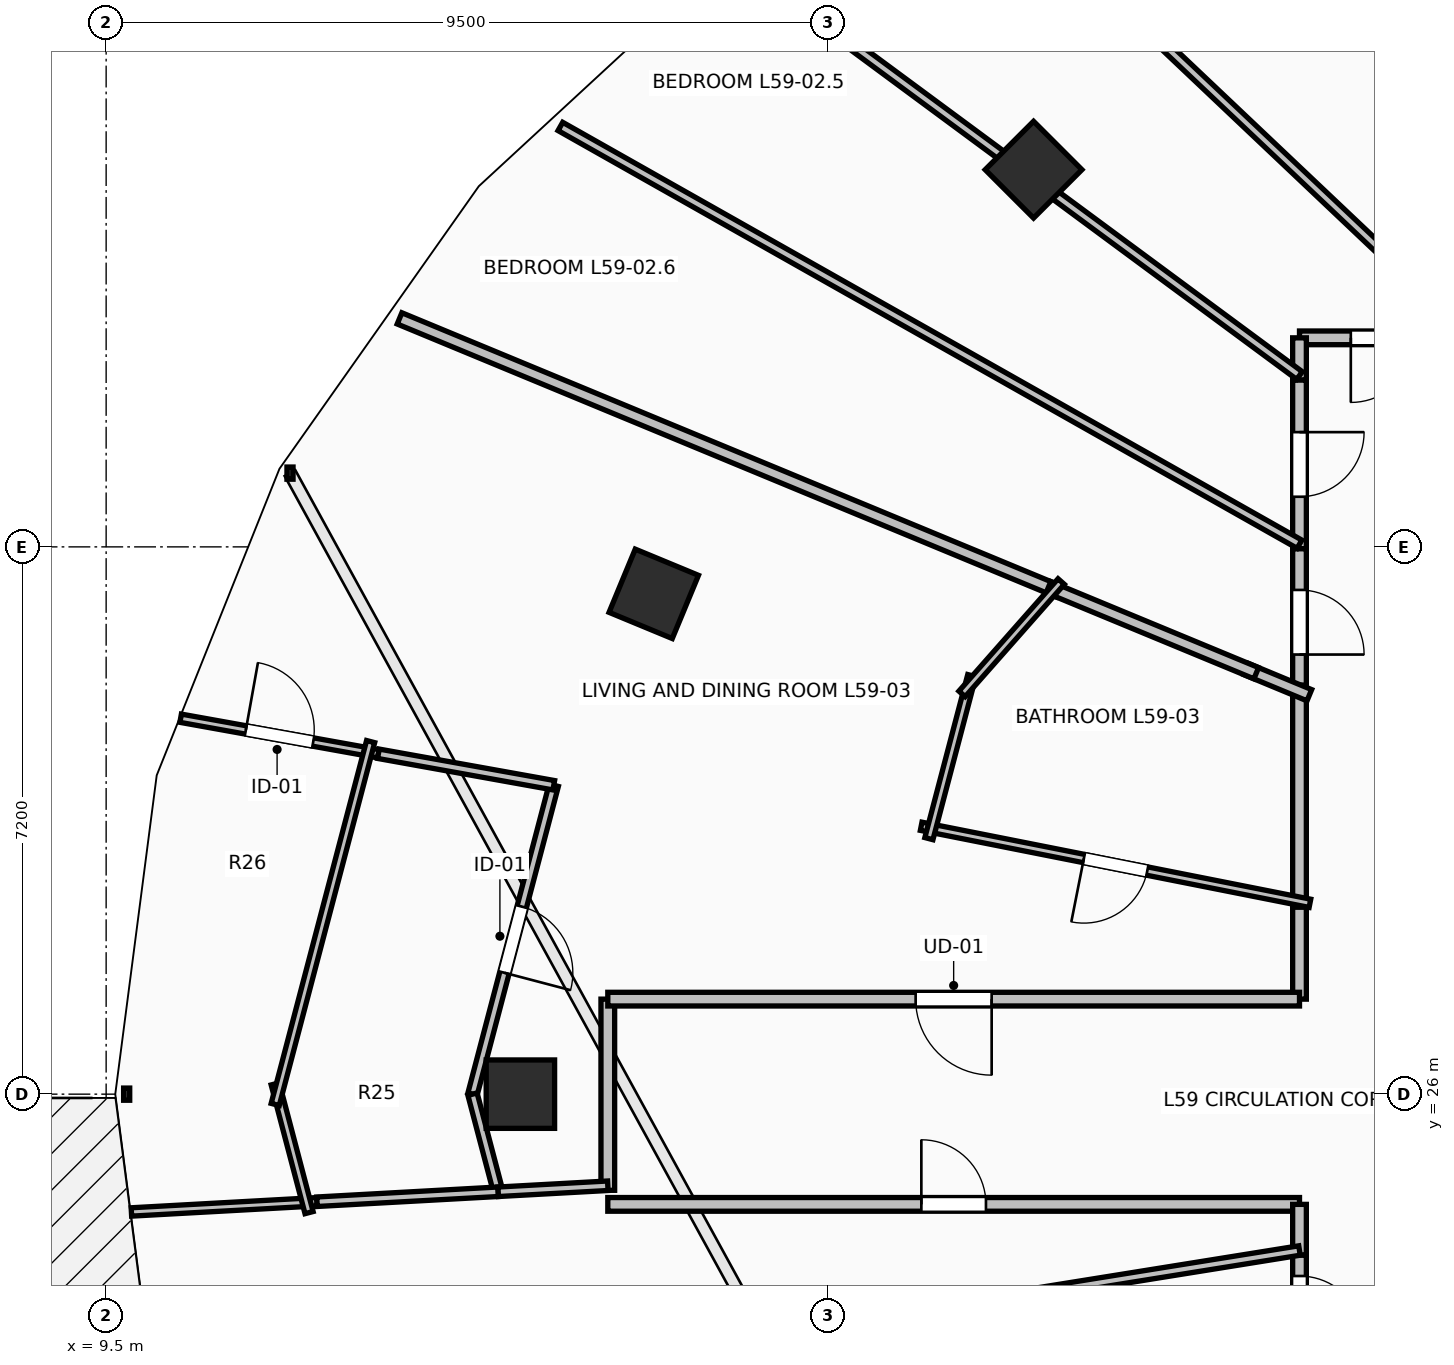
"""IFC4 building model, lengths in metres.
Left out: names, types, materials, properties, quantities, classifications, styles, units other than length and angle.
Written with IfcOpenShell. Run it as: python <this file> out.ifc"""

import sys

from ifc_helpers import new_model, si_unit, direction, frame, frame_2d, origin, origin_2d, place, context, subcontext, project, spatial, rectangle, extrude, element, fill, save


model = new_model("IFC4")
c1 = context("Model", 3, precision=1e-05, world=origin(), true_north=direction((0.0, 1.0)))
c2 = subcontext(c1, "Body", "Model", "MODEL_VIEW")
j1 = project(units=[si_unit("LENGTHUNIT", "METRE"), si_unit("PLANEANGLEUNIT", "RADIAN")], contexts=[c1])
p1 = place(None, origin())
s1 = spatial("IfcSite", under=j1, at=p1, CompositionType="ELEMENT")
p2 = place(p1, origin())
s2 = spatial("IfcBuilding", under=s1, at=p2, CompositionType="ELEMENT")
p3 = place(p2, frame((0.0, 0.0, 217.85)))
s3 = spatial("IfcBuildingStorey", under=s2, at=p3, CompositionType="ELEMENT", Elevation=217.85)
for number, where, z_axis, x_axis in (
    (1, (21.701, 38.162, 0.0), (0.0, 0.0, 1.0), (-0.707, 0.707, 0.0)),
    (2, (16.705, 32.582, 0.0), (0.0, 0.0, 1.0), (-0.924, 0.383, 0.0)),
    (3, (14.95, 26.0, 0.0), (0.0, 0.0, 1.0), (-1.0, 0.0, 0.0)),
):
    element("IfcColumn", number, at=place(p3, frame(where, z_axis=z_axis, x_axis=x_axis)), inside=s3, PredefinedType="COLUMN", context=c2, shape_type="SweptSolid", body=[
        extrude(rectangle(XDim=0.9, YDim=0.9, at=origin_2d()), origin(), (0.0, 0.0, 1.0), 3.55),
    ])
p4 = place(p3, frame((27.4, 35.95, 0.0), z_axis=(0.0, 0.0, 1.0), x_axis=(-1.0, 0.0, 0.0)))
e4 = element("IfcWall", 4, at=p4, inside=s3, PredefinedType="PARTITIONING", context=c2, shape_type="SweptSolid", body=[
    extrude(rectangle(XDim=2.2, YDim=0.18, at=frame_2d((1.1, 0.0))), origin(), (0.0, 0.0, 1.0), 2.924),
])
p5 = place(p4, frame((0.675, 0.0, 0.0)))
e5 = element("IfcOpeningElement", 5, at=p5, cuts=e4, PredefinedType="OPENING", context=c2, shape_type="SweptSolid", body=[
    extrude(rectangle(XDim=0.85, YDim=2.1, at=frame_2d((0.425, 1.05))), frame((0.0, 0.105, 0.0), z_axis=(0.0, -1.0, 0.0), x_axis=(1.0, 0.0, 0.0)), (0.0, 0.0, 1.0), 0.21),
])
p6 = place(p3, frame((25.2, 35.95, 0.0), z_axis=(0.0, 0.0, 1.0), x_axis=(0.0, -1.0, 0.0)))
e6 = element("IfcWall", 6, at=p6, inside=s3, PredefinedType="PARTITIONING", context=c2, shape_type="SweptSolid", body=[
    extrude(rectangle(XDim=0.556, YDim=0.18, at=frame_2d((0.278, 0.0))), origin(), (0.0, 0.0, 1.0), 3.29),
])
p7 = place(p3, frame((25.2, 35.394, 0.0), z_axis=(0.0, 0.0, 1.0), x_axis=(0.0, -1.0, 0.0)))
e7 = element("IfcWall", 7, at=p7, inside=s3, PredefinedType="PARTITIONING", context=c2, shape_type="SweptSolid", body=[
    extrude(rectangle(XDim=2.219, YDim=0.18, at=frame_2d((1.109, 0.0))), origin(), (0.0, 0.0, 1.0), 2.482),
])
p8 = place(p7, frame((0.685, 0.0, 0.0)))
e8 = element("IfcOpeningElement", 8, at=p8, cuts=e7, PredefinedType="OPENING", context=c2, shape_type="SweptSolid", body=[
    extrude(rectangle(XDim=0.85, YDim=2.1, at=frame_2d((0.425, 1.05))), frame((0.0, 0.105, 0.0), z_axis=(0.0, -1.0, 0.0), x_axis=(1.0, 0.0, 0.0)), (0.0, 0.0, 1.0), 0.21),
])
p9 = place(p3, frame((25.2, 33.175, 0.0), z_axis=(0.0, 0.0, 1.0), x_axis=(0.0, -1.0, 0.0)))
e9 = element("IfcWall", 9, at=p9, inside=s3, PredefinedType="PARTITIONING", context=c2, shape_type="SweptSolid", body=[
    extrude(rectangle(XDim=1.933, YDim=0.18, at=frame_2d((0.967, 0.0))), origin(), (0.0, 0.0, 1.0), 3.29),
])
p10 = place(p9, frame((0.542, 0.0, 0.0)))
e10 = element("IfcOpeningElement", 10, at=p10, cuts=e9, PredefinedType="OPENING", context=c2, shape_type="SweptSolid", body=[
    extrude(rectangle(XDim=0.85, YDim=2.1, at=frame_2d((0.425, 1.05))), frame((0.0, 0.105, 0.0), z_axis=(0.0, -1.0, 0.0), x_axis=(1.0, 0.0, 0.0)), (0.0, 0.0, 1.0), 0.21),
])
p11 = place(p3, frame((16.1, 27.25, 0.0), z_axis=(0.0, 0.0, 1.0), x_axis=(0.0, -1.0, 0.0)))
e11 = element("IfcWall", 11, at=p11, inside=s3, PredefinedType="PARTITIONING", context=c2, shape_type="SweptSolid", body=[
    extrude(rectangle(XDim=2.515, YDim=0.18, at=frame_2d((1.257, 0.0))), origin(), (0.0, 0.0, 1.0), 2.482),
])
p12 = place(p3, frame((25.2, 28.599, 0.0), z_axis=(0.0, 0.0, 1.0), x_axis=(0.0, -1.0, 0.0)))
e12 = element("IfcWall", 12, at=p12, inside=s3, PredefinedType="PARTITIONING", context=c2, shape_type="SweptSolid", body=[
    extrude(rectangle(XDim=1.349, YDim=0.18, at=frame_2d((0.675, 0.0))), origin(), (0.0, 0.0, 1.0), 2.482),
])
p13 = place(p3, frame((25.2, 27.25, 0.0), z_axis=(0.0, 0.0, 1.0), x_axis=(-1.0, 0.0, 0.0)))
e13 = element("IfcWall", 13, at=p13, inside=s3, PredefinedType="PARTITIONING", context=c2, shape_type="SweptSolid", body=[
    extrude(rectangle(XDim=9.1, YDim=0.18, at=frame_2d((4.55, 0.0))), origin(), (0.0, 0.0, 1.0), 2.482),
])
p14 = place(p13, frame((4.05, 0.0, 0.0)))
e14 = element("IfcOpeningElement", 14, at=p14, cuts=e13, PredefinedType="OPENING", context=c2, shape_type="SweptSolid", body=[
    extrude(rectangle(XDim=1.0, YDim=2.15, at=frame_2d((0.5, 1.075))), frame((0.0, 0.105, 0.0), z_axis=(0.0, -1.0, 0.0), x_axis=(1.0, 0.0, 0.0)), (0.0, 0.0, 1.0), 0.21),
])
p15 = place(p3, frame((25.2, 31.382, 0.0), z_axis=(0.0, 0.0, 1.0), x_axis=(0.0, -1.0, 0.0)))
e15 = element("IfcWall", 15, at=p15, inside=s3, PredefinedType="PARTITIONING", context=c2, shape_type="SweptSolid", body=[
    extrude(rectangle(XDim=2.923, YDim=0.18, at=frame_2d((1.461, 0.0))), origin(), (0.0, 0.0, 1.0), 2.482),
])
p16 = place(p3, frame((16.1, 24.55, 0.0), z_axis=(0.0, 0.0, 1.0), x_axis=(1.0, 0.0, 0.0)))
e16 = element("IfcWall", 16, at=p16, inside=s3, PredefinedType="PARTITIONING", context=c2, shape_type="SweptSolid", body=[
    extrude(rectangle(XDim=9.1, YDim=0.18, at=frame_2d((4.55, 0.0))), origin(), (0.0, 0.0, 1.0), 2.924),
])
p17 = place(p16, frame((4.125, 0.0, 0.0)))
e17 = element("IfcOpeningElement", 17, at=p17, cuts=e16, PredefinedType="OPENING", context=c2, shape_type="SweptSolid", body=[
    extrude(rectangle(XDim=0.85, YDim=2.1, at=frame_2d((0.425, 1.05))), frame((0.0, 0.105, 0.0), z_axis=(0.0, -1.0, 0.0), x_axis=(1.0, 0.0, 0.0)), (0.0, 0.0, 1.0), 0.21),
])
p18 = place(p3, frame((25.2, 24.55, 0.0), z_axis=(0.0, 0.0, 1.0), x_axis=(0.0, -1.0, 0.0)))
e18 = element("IfcWall", 18, at=p18, inside=s3, PredefinedType="PARTITIONING", context=c2, shape_type="SweptSolid", body=[
    extrude(rectangle(XDim=0.668, YDim=0.18, at=frame_2d((0.334, 0.0))), origin(), (0.0, 0.0, 1.0), 3.29),
])
p19 = place(p3, frame((25.2, 23.882, 0.0), z_axis=(0.0, 0.0, 1.0), x_axis=(0.0, -1.0, 0.0)))
e19 = element("IfcWall", 19, at=p19, inside=s3, PredefinedType="PARTITIONING", context=c2, shape_type="SweptSolid", body=[
    extrude(rectangle(XDim=1.399, YDim=0.18, at=frame_2d((0.7, 0.0))), origin(), (0.0, 0.0, 1.0), 3.29),
])
p20 = place(p19, frame((0.274, 0.0, 0.0)))
e20 = element("IfcOpeningElement", 20, at=p20, cuts=e19, PredefinedType="OPENING", context=c2, shape_type="SweptSolid", body=[
    extrude(rectangle(XDim=0.85, YDim=2.1, at=frame_2d((0.425, 1.05))), frame((0.0, 0.105, 0.0), z_axis=(0.0, -1.0, 0.0), x_axis=(1.0, 0.0, 0.0)), (0.0, 0.0, 1.0), 0.21),
])
p21 = place(p3, frame((25.749, 45.138, 0.0), z_axis=(0.0, 0.0, 1.0), x_axis=(0.539168632786, -0.842197830335, 0.0)))
e21 = element("IfcWall", 21, at=p21, inside=s3, PredefinedType="PARTITIONING", context=c2, shape_type="SweptSolid", body=[
    extrude(rectangle(XDim=10.909, YDim=0.125, at=frame_2d((5.455, 0.0))), origin(), (0.0, 0.0, 1.0), 2.482),
])
p22 = place(p3, frame((23.066, 44.052, 0.0), z_axis=(0.0, 0.0, 1.0), x_axis=(0.637453668746, -0.770488689211, 0.0)))
e22 = element("IfcWall", 22, at=p22, inside=s3, PredefinedType="PARTITIONING", context=c2, shape_type="SweptSolid", body=[
    extrude(rectangle(XDim=10.515, YDim=0.125, at=frame_2d((5.258, 0.0))), origin(), (0.0, 0.0, 1.0), 2.482),
])
p23 = place(p3, frame((20.462, 42.599, 0.0), z_axis=(0.0, 0.0, 1.0), x_axis=(0.726274273347, -0.687405033349, 0.0)))
e23 = element("IfcWall", 23, at=p23, inside=s3, PredefinedType="PARTITIONING", context=c2, shape_type="SweptSolid", body=[
    extrude(rectangle(XDim=9.673, YDim=0.125, at=frame_2d((4.836, 0.0))), origin(), (0.0, 0.0, 1.0), 2.824),
])
p24 = place(p3, frame((17.826, 40.901, 0.0), z_axis=(0.0, 0.0, 1.0), x_axis=(0.804363169868, -0.594137939338, 0.0)))
e24 = element("IfcWall", 24, at=p24, inside=s3, PredefinedType="PARTITIONING", context=c2, shape_type="SweptSolid", body=[
    extrude(rectangle(XDim=9.167, YDim=0.125, at=frame_2d((4.584, 0.0))), origin(), (0.0, 0.0, 1.0), 2.482),
])
p25 = place(p3, frame((15.476, 38.731, 0.0), z_axis=(0.0, 0.0, 1.0), x_axis=(0.870572608778, -0.49203997078, 0.0)))
e25 = element("IfcWall", 25, at=p25, inside=s3, PredefinedType="PARTITIONING", context=c2, shape_type="SweptSolid", body=[
    extrude(rectangle(XDim=11.169, YDim=0.125, at=frame_2d((5.585, 0.0))), origin(), (0.0, 0.0, 1.0), 2.824),
])
p26 = place(p3, frame((13.36, 36.206, 0.0), z_axis=(0.0, 0.0, 1.0), x_axis=(0.923875681471, -0.382692729466, 0.0)))
e26 = element("IfcWall", 26, at=p26, inside=s3, PredefinedType="PARTITIONING", context=c2, shape_type="SweptSolid", body=[
    extrude(rectangle(XDim=9.381, YDim=0.16, at=frame_2d((4.69, 0.0))), origin(), (0.0, 0.0, 1.0), 2.824),
])
p27 = place(p3, frame((24.502, 31.592, 0.0), z_axis=(0.0, 0.0, 1.0), x_axis=(0.923704487622, -0.383105755043, 0.0)))
e27 = element("IfcWall", 27, at=p27, inside=s3, PredefinedType="PARTITIONING", context=c2, shape_type="SweptSolid", body=[
    extrude(rectangle(XDim=0.896, YDim=0.16, at=frame_2d((0.448, 0.0))), origin(), (0.0, 0.0, 1.0), 3.29),
])
p28 = place(p3, frame((21.898, 32.67, 0.0), z_axis=(0.0, 0.0, 1.0), x_axis=(0.923953480513, -0.382504857286, 0.0)))
e28 = element("IfcWall", 28, at=p28, inside=s3, PredefinedType="PARTITIONING", context=c2, shape_type="SweptSolid", body=[
    extrude(rectangle(XDim=2.958, YDim=0.16, at=frame_2d((1.479, 0.0))), origin(), (0.0, 0.0, 1.0), 2.924),
])
p29 = place(p3, frame((25.337, 28.511, 0.0), z_axis=(0.0, 0.0, 1.0), x_axis=(-0.980930272027, 0.194359978959, 0.0)))
e29 = element("IfcWall", 29, at=p29, inside=s3, PredefinedType="PARTITIONING", context=c2, shape_type="SweptSolid", body=[
    extrude(rectangle(XDim=5.214, YDim=0.11, at=frame_2d((2.607, 0.0))), origin(), (0.0, 0.0, 1.0), 2.924),
])
p30 = place(p29, frame((2.182, 0.0, 0.0)))
e30 = element("IfcOpeningElement", 30, at=p30, cuts=e29, PredefinedType="OPENING", context=c2, shape_type="SweptSolid", body=[
    extrude(rectangle(XDim=0.85, YDim=2.1, at=frame_2d((0.425, 1.05))), frame((0.0, 0.07, 0.0), z_axis=(0.0, -1.0, 0.0), x_axis=(1.0, 0.0, 0.0)), (0.0, 0.0, 1.0), 0.14),
])
p31 = place(p3, frame((20.324, 29.362, 0.0), z_axis=(0.0, 0.0, 1.0), x_axis=(0.254406599134, 0.967097348935, 0.0)))
e31 = element("IfcWall", 31, at=p31, inside=s3, PredefinedType="PARTITIONING", context=c2, shape_type="SweptSolid", body=[
    extrude(rectangle(XDim=2.218, YDim=0.11, at=frame_2d((1.109, 0.0))), origin(), (0.0, 0.0, 1.0), 2.482),
])
p32 = place(p3, frame((20.76, 31.266, 0.0), z_axis=(0.0, 0.0, 1.0), x_axis=(0.661699472354, 0.749769170003, 0.0)))
e32 = element("IfcWall", 32, at=p32, inside=s3, PredefinedType="PARTITIONING", context=c2, shape_type="SweptSolid", body=[
    extrude(rectangle(XDim=1.971, YDim=0.11, at=frame_2d((0.985, 0.0))), origin(), (0.0, 0.0, 1.0), 3.29),
])
p33 = place(p3, frame((12.274, 24.585, 0.0), z_axis=(0.0, 0.0, 1.0), x_axis=(-0.998485442787, -0.055016547898, 0.0)))
e33 = element("IfcWall", 33, at=p33, inside=s3, PredefinedType="PARTITIONING", context=c2, shape_type="SweptSolid", body=[
    extrude(rectangle(XDim=2.445, YDim=0.11, at=frame_2d((1.223, 0.0))), origin(), (0.0, 0.0, 1.0), 3.29),
])
p34 = place(p3, frame((10.48, 30.946, 0.0), z_axis=(0.0, 0.0, 1.0), x_axis=(0.98423288508, -0.176877437587, 0.0)))
e34 = element("IfcWall", 34, at=p34, inside=s3, PredefinedType="PARTITIONING", context=c2, shape_type="SweptSolid", body=[
    extrude(rectangle(XDim=2.643, YDim=0.11, at=frame_2d((1.322, 0.0))), origin(), (0.0, 0.0, 1.0), 3.29),
])
p35 = place(p34, frame((0.872, 0.0, 0.0)))
e35 = element("IfcOpeningElement", 35, at=p35, cuts=e34, PredefinedType="OPENING", context=c2, shape_type="SweptSolid", body=[
    extrude(rectangle(XDim=0.9, YDim=2.1, at=frame_2d((0.45, 1.05))), frame((0.0, 0.07, 0.0), z_axis=(0.0, -1.0, 0.0), x_axis=(1.0, 0.0, 0.0)), (0.0, 0.0, 1.0), 0.14),
])
p36 = place(p3, frame((15.389, 30.064, 0.0), z_axis=(0.0, 0.0, 1.0), x_axis=(-0.254356027292, -0.967110651053, 0.0)))
e36 = element("IfcWall", 36, at=p36, inside=s3, PredefinedType="PARTITIONING", context=c2, shape_type="SweptSolid", body=[
    extrude(rectangle(XDim=4.202, YDim=0.125, at=frame_2d((2.101, 0.0))), origin(), (0.0, 0.0, 1.0), 3.29),
])
p37 = place(p36, frame((1.651, 0.0, 0.0)))
e37 = element("IfcOpeningElement", 37, at=p37, cuts=e36, PredefinedType="OPENING", context=c2, shape_type="SweptSolid", body=[
    extrude(rectangle(XDim=0.9, YDim=2.1, at=frame_2d((0.45, 1.05))), frame((0.0, 0.077, 0.0), z_axis=(0.0, -1.0, 0.0), x_axis=(1.0, 0.0, 0.0)), (0.0, 0.0, 1.0), 0.155),
])
p38 = place(p3, frame((14.32, 26.0, 0.0), z_axis=(0.0, 0.0, 1.0), x_axis=(0.254502350799, -0.967072155239, 0.0)))
e38 = element("IfcWall", 38, at=p38, inside=s3, PredefinedType="PARTITIONING", context=c2, shape_type="SweptSolid", body=[
    extrude(rectangle(XDim=1.328, YDim=0.125, at=frame_2d((0.664, 0.0))), origin(), (0.0, 0.0, 1.0), 3.29),
])
p39 = place(p3, frame((14.658, 24.716, 0.0), z_axis=(0.0, 0.0, 1.0), x_axis=(-0.998486041439, -0.055005681988, 0.0)))
e39 = element("IfcWall", 39, at=p39, inside=s3, PredefinedType="PARTITIONING", context=c2, shape_type="SweptSolid", body=[
    extrude(rectangle(XDim=2.388, YDim=0.125, at=frame_2d((1.194, 0.0))), origin(), (0.0, 0.0, 1.0), 3.29),
])
p40 = place(p3, frame((13.082, 30.478, 0.0), z_axis=(0.0, 0.0, 1.0), x_axis=(0.984255878712, -0.176749441923, 0.0)))
e40 = element("IfcWall", 40, at=p40, inside=s3, PredefinedType="PARTITIONING", context=c2, shape_type="SweptSolid", body=[
    extrude(rectangle(XDim=2.344, YDim=0.125, at=frame_2d((1.172, 0.0))), origin(), (0.0, 0.0, 1.0), 3.29),
])
p41 = place(p3, frame((14.658, 24.716, 0.0), z_axis=(0.0, 0.0, 1.0), x_axis=(0.99849911476, 0.054767853933, 0.0)))
e41 = element("IfcWall", 41, at=p41, inside=s3, PredefinedType="PARTITIONING", context=c2, shape_type="SweptSolid", body=[
    extrude(rectangle(XDim=1.444, YDim=0.125, at=frame_2d((0.722, 0.0))), origin(), (0.0, 0.0, 1.0), 2.824),
])
p42 = place(p3, frame((12.17, 24.442, 0.0), z_axis=(0.0, 0.0, 1.0), x_axis=(-0.254260000639, 0.967135901554, 0.0)))
e42 = element("IfcWall", 42, at=p42, inside=s3, PredefinedType="PARTITIONING", context=c2, shape_type="SweptSolid", body=[
    extrude(rectangle(XDim=1.751, YDim=0.11, at=frame_2d((0.876, 0.0))), origin(), (0.0, 0.0, 1.0), 3.29),
])
p43 = place(p3, frame((11.724, 25.865, 0.0), z_axis=(0.0, 0.0, 1.0), x_axis=(0.254271749518, 0.967132812698, 0.0)))
e43 = element("IfcWall", 43, at=p43, inside=s3, PredefinedType="PARTITIONING", context=c2, shape_type="SweptSolid", body=[
    extrude(rectangle(XDim=4.936, YDim=0.11, at=frame_2d((2.468, 0.0))), origin(), (0.0, 0.0, 1.0), 3.29),
])
p44 = place(p3, frame((10.422, 21.569, 0.0), z_axis=(0.0, 0.0, 1.0), x_axis=(0.987340682458, 0.158613923612, 0.0)))
e44 = element("IfcWall", 44, at=p44, inside=s3, PredefinedType="PARTITIONING", context=c2, shape_type="SweptSolid", body=[
    extrude(rectangle(XDim=14.967, YDim=0.125, at=frame_2d((7.484, 0.0))), origin(), (0.0, 0.0, 1.0), 2.824),
])
p45 = place(p14, origin())
e45 = element("IfcDoor", 45, at=p45, inside=s3, OperationType="SINGLE_SWING_LEFT", PredefinedType="DOOR", context=c2, shape_type="SweptSolid", body=[
    extrude(rectangle(XDim=1.0, YDim=2.15, at=frame_2d((0.5, 1.075))), frame((0.0, 0.025, 0.0), z_axis=(0.0, -1.0, 0.0), x_axis=(1.0, 0.0, 0.0)), (0.0, 0.0, 1.0), 0.05),
])
fill(e14, e45)
p46 = place(p30, origin())
e46 = element("IfcDoor", 46, at=p46, inside=s3, OperationType="SINGLE_SWING_RIGHT", PredefinedType="DOOR", context=c2, shape_type="SweptSolid", body=[
    extrude(rectangle(XDim=0.85, YDim=2.1, at=frame_2d((0.425, 1.05))), frame((0.0, 0.025, 0.0), z_axis=(0.0, -1.0, 0.0), x_axis=(1.0, 0.0, 0.0)), (0.0, 0.0, 1.0), 0.05),
])
fill(e30, e46)
p47 = place(p35, origin())
e47 = element("IfcDoor", 47, at=p47, inside=s3, OperationType="SINGLE_SWING_LEFT", PredefinedType="DOOR", context=c2, shape_type="SweptSolid", body=[
    extrude(rectangle(XDim=0.9, YDim=2.1, at=frame_2d((0.45, 1.05))), frame((0.0, 0.025, 0.0), z_axis=(0.0, -1.0, 0.0), x_axis=(1.0, 0.0, 0.0)), (0.0, 0.0, 1.0), 0.05),
])
fill(e35, e47)
p48 = place(p37, origin())
e48 = element("IfcDoor", 48, at=p48, inside=s3, OperationType="SINGLE_SWING_RIGHT", PredefinedType="DOOR", context=c2, shape_type="SweptSolid", body=[
    extrude(rectangle(XDim=0.9, YDim=2.1, at=frame_2d((0.45, 1.05))), frame((0.0, 0.025, 0.0), z_axis=(0.0, -1.0, 0.0), x_axis=(1.0, 0.0, 0.0)), (0.0, 0.0, 1.0), 0.05),
])
fill(e37, e48)
p49 = place(p5, origin())
e49 = element("IfcDoor", 49, at=p49, inside=s3, OperationType="SINGLE_SWING_RIGHT", PredefinedType="DOOR", context=c2, shape_type="SweptSolid", body=[
    extrude(rectangle(XDim=0.85, YDim=2.1, at=frame_2d((0.425, 1.05))), frame((0.0, 0.025, 0.0), z_axis=(0.0, -1.0, 0.0), x_axis=(1.0, 0.0, 0.0)), (0.0, 0.0, 1.0), 0.05),
])
fill(e5, e49)
p50 = place(p8, origin())
e50 = element("IfcDoor", 50, at=p50, inside=s3, OperationType="SINGLE_SWING_LEFT", PredefinedType="DOOR", context=c2, shape_type="SweptSolid", body=[
    extrude(rectangle(XDim=0.85, YDim=2.1, at=frame_2d((0.425, 1.05))), frame((0.0, 0.025, 0.0), z_axis=(0.0, -1.0, 0.0), x_axis=(1.0, 0.0, 0.0)), (0.0, 0.0, 1.0), 0.05),
])
fill(e8, e50)
p51 = place(p10, origin())
e51 = element("IfcDoor", 51, at=p51, inside=s3, OperationType="SINGLE_SWING_RIGHT", PredefinedType="DOOR", context=c2, shape_type="SweptSolid", body=[
    extrude(rectangle(XDim=0.85, YDim=2.1, at=frame_2d((0.425, 1.05))), frame((0.0, 0.025, 0.0), z_axis=(0.0, -1.0, 0.0), x_axis=(1.0, 0.0, 0.0)), (0.0, 0.0, 1.0), 0.05),
])
fill(e10, e51)
p52 = place(p17, origin())
e52 = element("IfcDoor", 52, at=p52, inside=s3, OperationType="SINGLE_SWING_LEFT", PredefinedType="DOOR", context=c2, shape_type="SweptSolid", body=[
    extrude(rectangle(XDim=0.85, YDim=2.1, at=frame_2d((0.425, 1.05))), frame((0.0, 0.025, 0.0), z_axis=(0.0, -1.0, 0.0), x_axis=(1.0, 0.0, 0.0)), (0.0, 0.0, 1.0), 0.05),
])
fill(e17, e52)
p53 = place(p20, origin())
e53 = element("IfcDoor", 53, at=p53, inside=s3, OperationType="SINGLE_SWING_RIGHT", PredefinedType="DOOR", context=c2, shape_type="SweptSolid", body=[
    extrude(rectangle(XDim=0.85, YDim=2.1, at=frame_2d((0.425, 1.05))), frame((0.0, 0.025, 0.0), z_axis=(0.0, -1.0, 0.0), x_axis=(1.0, 0.0, 0.0)), (0.0, 0.0, 1.0), 0.05),
])
fill(e20, e53)
save(model, sys.argv[1])
